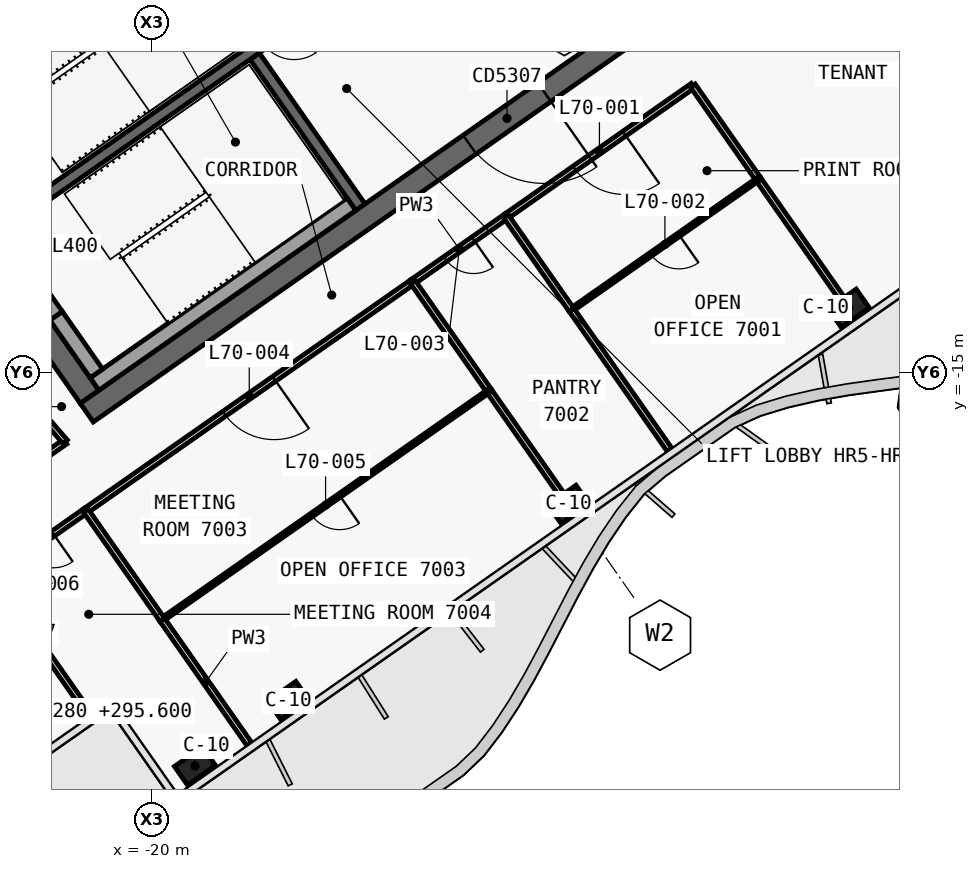
"""IFC4 building model, lengths in metres.
Left out: names, types, materials, properties, quantities, classifications, styles, units other than length and angle.
Written with IfcOpenShell. Run it as: python <this file> out.ifc"""

import sys

from ifc_helpers import new_model, si_unit, direction, frame, frame_2d, origin, origin_2d, place, context, subcontext, project, spatial, polyline, rectangle, outline, extrude, element, fill, save


model = new_model("IFC4")
c1 = context("Model", 3, precision=1e-05, world=origin(), true_north=direction((0.0, 1.0)))
c2 = subcontext(c1, "Body", "Model", "MODEL_VIEW")
j1 = project(units=[si_unit("LENGTHUNIT", "METRE"), si_unit("PLANEANGLEUNIT", "RADIAN")], contexts=[c1])
p1 = place(None, origin())
s1 = spatial("IfcSite", under=j1, at=p1, CompositionType="ELEMENT")
p2 = place(p1, origin())
s2 = spatial("IfcBuilding", under=s1, at=p2, CompositionType="ELEMENT")
p3 = place(p2, frame((0.0, 0.0, 295.6)))
s3 = spatial("IfcBuildingStorey", under=s2, at=p3, CompositionType="ELEMENT", Elevation=295.6)
p4 = place(p3, frame((-0.028, 12.066, 0.0), z_axis=(0.0, 0.0, 1.0), x_axis=(-0.819151382952, -0.573577380837, 0.0)))
e1 = element("IfcWall", 1, at=p4, inside=s3, PredefinedType="SHEAR", context=c2, shape_type="SweptSolid", body=[
    extrude(outline(polyline([(33.898, 0.3), (0.42, 0.3), (0.0, -0.3), (33.898, -0.3), (33.898, 0.3)])), origin(), (0.0, 0.0, 1.0), 3.9),
])
p5 = place(p3, frame((-0.028, -0.874, 0.0), z_axis=(0.0, 0.0, 1.0), x_axis=(-0.819150035022, -0.573579305871, 0.0)))
e2 = element("IfcWall", 2, at=p5, inside=s3, PredefinedType="SHEAR", context=c2, shape_type="SweptSolid", body=[
    extrude(outline(polyline([(26.476, 0.3), (0.42, 0.3), (0.0, -0.3), (26.476, -0.3), (26.476, 0.3)])), origin(), (0.0, 0.0, 1.0), 3.9),
])
p6 = place(p5, frame((2.976, 0.0, 0.0)))
e3 = element("IfcOpeningElement", 3, at=p6, cuts=e2, PredefinedType="OPENING", context=c2, shape_type="SweptSolid", body=[
    extrude(rectangle(XDim=2.4, YDim=2.1, at=frame_2d((1.2, 1.05))), frame((0.0, 0.31, 0.0), z_axis=(0.0, -1.0, 0.0), x_axis=(1.0, 0.0, 0.0)), (0.0, 0.0, 1.0), 0.62),
])
p7 = place(p5, frame((11.776, 0.0, 0.0)))
e4 = element("IfcOpeningElement", 4, at=p7, cuts=e2, PredefinedType="OPENING", context=c2, shape_type="SweptSolid", body=[
    extrude(rectangle(XDim=2.4, YDim=2.1, at=frame_2d((1.2, 1.05))), frame((0.0, 0.31, 0.0), z_axis=(0.0, -1.0, 0.0), x_axis=(1.0, 0.0, 0.0)), (0.0, 0.0, 1.0), 0.62),
])
p8 = place(p3, frame((-21.642, -15.642, 0.0), z_axis=(0.0, 0.0, 1.0), x_axis=(-0.573586866468, 0.819144740944, 0.0)))
e5 = element("IfcWall", 5, at=p8, inside=s3, PredefinedType="SHEAR", context=c2, shape_type="SweptSolid", body=[
    extrude(outline(polyline([(0.0, 0.3), (0.0, -0.3), (10.0, -0.3), (10.0, 0.3), (0.0, 0.3)])), origin(), (0.0, 0.0, 1.0), 3.9),
])
p9 = place(p8, frame((6.5, 0.0, 0.0)))
e6 = element("IfcOpeningElement", 6, at=p9, cuts=e5, PredefinedType="OPENING", context=c2, shape_type="SweptSolid", body=[
    extrude(rectangle(XDim=1.8, YDim=2.1, at=frame_2d((0.9, 1.05))), frame((0.0, 0.31, 0.0), z_axis=(0.0, -1.0, 0.0), x_axis=(1.0, 0.0, 0.0)), (0.0, 0.0, 1.0), 0.62),
])
p10 = place(p8, frame((2.3, 0.0, 0.0)))
e7 = element("IfcOpeningElement", 7, at=p10, cuts=e5, PredefinedType="OPENING", context=c2, shape_type="SweptSolid", body=[
    extrude(rectangle(XDim=1.8, YDim=2.1, at=frame_2d((0.9, 1.05))), frame((0.0, 0.31, 0.0), z_axis=(0.0, -1.0, 0.0), x_axis=(1.0, 0.0, 0.0)), (0.0, 0.0, 1.0), 0.62),
])
p11 = place(p3, frame((-14.515, -10.652, 0.0), z_axis=(0.0, 0.0, 1.0), x_axis=(-0.573560315113, 0.819163332265, 0.0)))
e8 = element("IfcWall", 8, at=p11, inside=s3, PredefinedType="SHEAR", context=c2, shape_type="SweptSolid", body=[
    extrude(outline(polyline([(4.85, 0.15), (0.0, 0.15), (0.0, -0.15), (4.85, -0.15), (4.85, 0.15)])), origin(), (0.0, 0.0, 1.0), 3.9),
])
p12 = place(p3, frame((-2.638, 3.768, 0.0), z_axis=(0.0, 0.0, 1.0), x_axis=(-0.819155014212, -0.573572194837, 0.0)))
e9 = element("IfcWall", 9, at=p12, inside=s3, PredefinedType="SHEAR", context=c2, shape_type="SweptSolid", body=[
    extrude(outline(polyline([(26.4, 0.15), (0.0, 0.15), (0.0, -0.15), (26.4, -0.15), (26.4, 0.15)])), origin(), (0.0, 0.0, 1.0), 3.9),
])
p13 = place(p12, frame((1.169, 0.0, 0.0)))
e10 = element("IfcOpeningElement", 10, at=p13, cuts=e9, PredefinedType="OPENING", context=c2, shape_type="SweptSolid", body=[
    extrude(rectangle(XDim=1.1, YDim=2.1, at=frame_2d((0.55, 1.05))), frame((0.0, 0.16, 0.0), z_axis=(0.0, -1.0, 0.0), x_axis=(1.0, 0.0, 0.0)), (0.0, 0.0, 1.0), 0.32),
])
p14 = place(p12, frame((3.206, 0.0, 0.0)))
e11 = element("IfcOpeningElement", 11, at=p14, cuts=e9, PredefinedType="OPENING", context=c2, shape_type="SweptSolid", body=[
    extrude(rectangle(XDim=1.1, YDim=2.1, at=frame_2d((0.55, 1.05))), frame((0.0, 0.16, 0.0), z_axis=(0.0, -1.0, 0.0), x_axis=(1.0, 0.0, 0.0)), (0.0, 0.0, 1.0), 0.32),
])
p15 = place(p12, frame((5.244, 0.0, 0.0)))
e12 = element("IfcOpeningElement", 12, at=p15, cuts=e9, PredefinedType="OPENING", context=c2, shape_type="SweptSolid", body=[
    extrude(rectangle(XDim=1.1, YDim=2.1, at=frame_2d((0.55, 1.05))), frame((0.0, 0.16, 0.0), z_axis=(0.0, -1.0, 0.0), x_axis=(1.0, 0.0, 0.0)), (0.0, 0.0, 1.0), 0.32),
])
p16 = place(p12, frame((7.281, 0.0, 0.0)))
e13 = element("IfcOpeningElement", 13, at=p16, cuts=e9, PredefinedType="OPENING", context=c2, shape_type="SweptSolid", body=[
    extrude(rectangle(XDim=1.1, YDim=2.1, at=frame_2d((0.55, 1.05))), frame((0.0, 0.16, 0.0), z_axis=(0.0, -1.0, 0.0), x_axis=(1.0, 0.0, 0.0)), (0.0, 0.0, 1.0), 0.32),
])
p17 = place(p12, frame((9.688, 0.0, 0.0)))
e14 = element("IfcOpeningElement", 14, at=p17, cuts=e9, PredefinedType="OPENING", context=c2, shape_type="SweptSolid", body=[
    extrude(rectangle(XDim=1.1, YDim=2.1, at=frame_2d((0.55, 1.05))), frame((0.0, 0.16, 0.0), z_axis=(0.0, -1.0, 0.0), x_axis=(1.0, 0.0, 0.0)), (0.0, 0.0, 1.0), 0.32),
])
p18 = place(p12, frame((11.863, 0.0, 0.0)))
e15 = element("IfcOpeningElement", 15, at=p18, cuts=e9, PredefinedType="OPENING", context=c2, shape_type="SweptSolid", body=[
    extrude(rectangle(XDim=1.1, YDim=2.1, at=frame_2d((0.55, 1.05))), frame((0.0, 0.16, 0.0), z_axis=(0.0, -1.0, 0.0), x_axis=(1.0, 0.0, 0.0)), (0.0, 0.0, 1.0), 0.32),
])
p19 = place(p12, frame((14.552, 0.0, 0.0)))
e16 = element("IfcOpeningElement", 16, at=p19, cuts=e9, PredefinedType="OPENING", context=c2, shape_type="SweptSolid", body=[
    extrude(rectangle(XDim=1.0, YDim=2.1, at=frame_2d((0.5, 1.05))), frame((0.0, 0.16, 0.0), z_axis=(0.0, -1.0, 0.0), x_axis=(1.0, 0.0, 0.0)), (0.0, 0.0, 1.0), 0.32),
])
p20 = place(p12, frame((16.627, 0.0, 0.0)))
e17 = element("IfcOpeningElement", 17, at=p20, cuts=e9, PredefinedType="OPENING", context=c2, shape_type="SweptSolid", body=[
    extrude(rectangle(XDim=1.0, YDim=2.1, at=frame_2d((0.5, 1.05))), frame((0.0, 0.16, 0.0), z_axis=(0.0, -1.0, 0.0), x_axis=(1.0, 0.0, 0.0)), (0.0, 0.0, 1.0), 0.32),
])
for number, where, z_axis, x_axis in (
    (18, (-1.665, -13.313, 0.0), (0.0, 0.0, 1.0), (-0.819, -0.574, 0.0)),
    (19, (-9.038, -18.475, 0.0), (0.0, 0.0, 1.0), (-0.819, -0.574, 0.0)),
    (20, (-16.41, -23.637, 0.0), (0.0, 0.0, 1.0), (-0.819, -0.574, 0.0)),
    (21, (-18.867, -25.358, 0.0), (0.0, 0.0, 1.0), (-0.819, -0.574, 0.0)),
):
    element("IfcColumn", number, at=place(p3, frame(where, z_axis=z_axis, x_axis=x_axis)), inside=s3, PredefinedType="COLUMN", context=c2, shape_type="SweptSolid", body=[
        extrude(rectangle(XDim=0.9, YDim=0.6, at=origin_2d()), origin(), (0.0, 0.0, 1.0), 3.9),
    ])
p21 = place(p3, frame((-20.259, -2.71, 0.0), z_axis=(0.0, 0.0, 1.0), x_axis=(-0.81914849389, -0.573581506813, 0.0)))
e22 = element("IfcWall", 22, at=p21, inside=s3, PredefinedType="SOLIDWALL", context=c2, shape_type="SweptSolid", body=[
    extrude(rectangle(XDim=8.25, YDim=0.4, at=frame_2d((4.125, 0.0))), origin(), (0.0, 0.0, 1.0), 3.62),
])
p22 = place(p3, frame((-14.753, -10.574, 0.0), z_axis=(0.0, 0.0, 1.0), x_axis=(-0.819158229677, -0.573567602601, 0.0)))
e23 = element("IfcWall", 23, at=p22, inside=s3, PredefinedType="SOLIDWALL", context=c2, shape_type="SweptSolid", body=[
    extrude(rectangle(XDim=8.25, YDim=0.4, at=frame_2d((4.125, 0.0))), origin(), (0.0, 0.0, 1.0), 3.62),
])
p23 = place(p3, frame((-21.462, -15.028, 0.0), z_axis=(0.0, 0.0, 1.0), x_axis=(-0.573559770908, 0.819163713305, 0.0)))
e24 = element("IfcWall", 24, at=p23, inside=s3, PredefinedType="SOLIDWALL", context=c2, shape_type="SweptSolid", body=[
    extrude(rectangle(XDim=1.85, YDim=0.4, at=frame_2d((0.925, 0.0))), origin(), (0.0, 0.0, 1.0), 3.62),
])
p24 = place(p3, frame((-22.523, -13.512, 2.15), z_axis=(0.0, 0.0, 1.0), x_axis=(-0.573591692345, 0.819141361715, 0.0)))
e25 = element("IfcWall", 25, at=p24, inside=s3, PredefinedType="SOLIDWALL", context=c2, shape_type="SweptSolid", body=[
    extrude(rectangle(XDim=1.9, YDim=0.4, at=frame_2d((0.95, 0.0))), origin(), (0.0, 0.0, 1.0), 1.47),
])
p25 = place(p3, frame((-26.54, -19.804, 0.0), z_axis=(0.0, 0.0, 1.0), x_axis=(0.819163496387, 0.573560080713, 0.0)))
e26 = element("IfcWall", 26, at=p25, inside=s3, PredefinedType="PARTITIONING", context=c2, shape_type="SweptSolid", body=[
    extrude(rectangle(XDim=5.197, YDim=0.15, at=frame_2d((2.598, 0.0))), origin(), (0.0, 0.0, 1.0), 3.05),
])
p26 = place(p25, frame((1.799, 0.0, 0.0)))
e27 = element("IfcOpeningElement", 27, at=p26, cuts=e26, PredefinedType="OPENING", context=c2, shape_type="SweptSolid", body=[
    extrude(rectangle(XDim=1.6, YDim=2.1, at=frame_2d((0.8, 1.05))), frame((0.0, 0.085, 0.0), z_axis=(0.0, -1.0, 0.0), x_axis=(1.0, 0.0, 0.0)), (0.0, 0.0, 1.0), 0.17),
])
p27 = place(p3, frame((-5.766, -7.456, 0.0), z_axis=(0.0, 0.0, 1.0), x_axis=(-0.819147828287, -0.573582457378, 0.0)))
e28 = element("IfcWall", 28, at=p27, inside=s3, PredefinedType="PARTITIONING", context=c2, shape_type="SweptSolid", body=[
    extrude(rectangle(XDim=6.002, YDim=0.15, at=frame_2d((3.001, 0.0))), origin(), (0.0, 0.0, 1.0), 3.05),
])
p28 = place(p27, frame((2.201, 0.0, 0.0)))
e29 = element("IfcOpeningElement", 29, at=p28, cuts=e28, PredefinedType="OPENING", context=c2, shape_type="SweptSolid", body=[
    extrude(rectangle(XDim=1.6, YDim=2.1, at=frame_2d((0.8, 1.05))), frame((0.0, 0.085, 0.0), z_axis=(0.0, -1.0, 0.0), x_axis=(1.0, 0.0, 0.0)), (0.0, 0.0, 1.0), 0.17),
])
p29 = place(p3, frame((-10.68, -10.896, 0.0), z_axis=(0.0, 0.0, 1.0), x_axis=(-0.819128818764, -0.573609604409, 0.0)))
e30 = element("IfcWall", 30, at=p29, inside=s3, PredefinedType="PARTITIONING", context=c2, shape_type="SweptSolid", body=[
    extrude(rectangle(XDim=3.004, YDim=0.15, at=frame_2d((1.502, 0.0))), origin(), (0.0, 0.0, 1.0), 3.05),
])
p30 = place(p29, frame((1.052, 0.0, 0.0)))
e31 = element("IfcOpeningElement", 31, at=p30, cuts=e30, PredefinedType="OPENING", context=c2, shape_type="SweptSolid", body=[
    extrude(rectangle(XDim=0.9, YDim=2.1, at=frame_2d((0.45, 1.05))), frame((0.0, 0.085, 0.0), z_axis=(0.0, -1.0, 0.0), x_axis=(1.0, 0.0, 0.0)), (0.0, 0.0, 1.0), 0.17),
])
p31 = place(p3, frame((-13.137, -12.617, 0.0), z_axis=(0.0, 0.0, 1.0), x_axis=(-0.819156568366, -0.573569975245, 0.0)))
e32 = element("IfcWall", 32, at=p31, inside=s3, PredefinedType="PARTITIONING", context=c2, shape_type="SweptSolid", body=[
    extrude(rectangle(XDim=10.504, YDim=0.15, at=frame_2d((5.252, 0.0))), origin(), (0.0, 0.0, 1.0), 3.05),
])
p32 = place(p31, frame((4.452, 0.0, 0.0)))
e33 = element("IfcOpeningElement", 33, at=p32, cuts=e32, PredefinedType="OPENING", context=c2, shape_type="SweptSolid", body=[
    extrude(rectangle(XDim=1.6, YDim=2.1, at=frame_2d((0.8, 1.05))), frame((0.0, 0.085, 0.0), z_axis=(0.0, -1.0, 0.0), x_axis=(1.0, 0.0, 0.0)), (0.0, 0.0, 1.0), 0.17),
])
p33 = place(p3, frame((-21.738, -18.639, 0.0), z_axis=(0.0, 0.0, 1.0), x_axis=(-0.81916700466, -0.573555070134, 0.0)))
e34 = element("IfcWall", 34, at=p33, inside=s3, PredefinedType="PARTITIONING", context=c2, shape_type="SweptSolid", body=[
    extrude(rectangle(XDim=3.004, YDim=0.15, at=frame_2d((1.502, 0.0))), origin(), (0.0, 0.0, 1.0), 3.05),
])
p34 = place(p33, frame((1.052, 0.0, 0.0)))
e35 = element("IfcOpeningElement", 35, at=p34, cuts=e34, PredefinedType="OPENING", context=c2, shape_type="SweptSolid", body=[
    extrude(rectangle(XDim=0.9, YDim=2.1, at=frame_2d((0.45, 1.05))), frame((0.0, 0.085, 0.0), z_axis=(0.0, -1.0, 0.0), x_axis=(1.0, 0.0, 0.0)), (0.0, 0.0, 1.0), 0.17),
])
p35 = place(p3, frame((-1.849, -13.051, 0.0), z_axis=(0.0, 0.0, 1.0), x_axis=(-0.573586379587, 0.81914508187, 0.0)))
e36 = element("IfcWall", 36, at=p35, inside=s3, PredefinedType="PARTITIONING", context=c2, shape_type="SweptSolid", body=[
    extrude(rectangle(XDim=3.831, YDim=0.15, at=frame_2d((1.916, 0.0))), origin(), (0.0, 0.0, 1.0), 3.05),
])
p36 = place(p3, frame((-4.044, -9.915, 0.0), z_axis=(0.0, 0.0, 1.0), x_axis=(-0.573609604409, 0.819128818764, 0.0)))
e37 = element("IfcWall", 37, at=p36, inside=s3, PredefinedType="PARTITIONING", context=c2, shape_type="SweptSolid", body=[
    extrude(rectangle(XDim=3.004, YDim=0.15, at=frame_2d((1.502, 0.0))), origin(), (0.0, 0.0, 1.0), 3.05),
])
p37 = place(p3, frame((-22.284, -16.826, 0.0), z_axis=(0.0, 0.0, 1.0), x_axis=(-0.656758142177, 0.754101281449, 0.0)))
e38 = element("IfcWall", 38, at=p37, inside=s3, PredefinedType="PARTITIONING", context=c2, shape_type="SweptSolid", body=[
    extrude(rectangle(XDim=6.539, YDim=0.15, at=frame_2d((3.269, 0.0))), origin(), (0.0, 0.0, 1.0), 3.62),
])
p38 = place(p3, frame((-4.045, -9.914, 0.0), z_axis=(0.0, 0.0, 1.0), x_axis=(-0.819149710902, -0.573579768758, 0.0)))
e39 = element("IfcWall", 39, at=p38, inside=s3, PredefinedType="PARTITIONING", context=c2, shape_type="SweptSolid", body=[
    extrude(rectangle(XDim=6.0, YDim=0.1, at=frame_2d((3.0, 0.0))), origin(), (0.0, 0.0, 1.0), 3.05),
])
p39 = place(p38, frame((2.55, 0.0, 0.0)))
e40 = element("IfcOpeningElement", 40, at=p39, cuts=e39, PredefinedType="OPENING", context=c2, shape_type="SweptSolid", body=[
    extrude(rectangle(XDim=0.9, YDim=2.1, at=frame_2d((0.45, 1.05))), frame((0.0, 0.06, 0.0), z_axis=(0.0, -1.0, 0.0), x_axis=(1.0, 0.0, 0.0)), (0.0, 0.0, 1.0), 0.12),
])
p40 = place(p3, frame((-6.379, -17.041, 0.0), z_axis=(0.0, 0.0, 1.0), x_axis=(-0.573564311442, 0.819160534108, 0.0)))
e41 = element("IfcWall", 41, at=p40, inside=s3, PredefinedType="PARTITIONING", context=c2, shape_type="SweptSolid", body=[
    extrude(rectangle(XDim=4.499, YDim=0.15, at=frame_2d((2.25, 0.0))), origin(), (0.0, 0.0, 1.0), 3.0),
])
p41 = place(p3, frame((-8.96, -13.355, 0.0), z_axis=(0.0, 0.0, 1.0), x_axis=(-0.573615254604, 0.819124862085, 0.0)))
e42 = element("IfcWall", 42, at=p41, inside=s3, PredefinedType="PARTITIONING", context=c2, shape_type="SweptSolid", body=[
    extrude(rectangle(XDim=3.0, YDim=0.15, at=frame_2d((1.5, 0.0))), origin(), (0.0, 0.0, 1.0), 3.62),
])
p42 = place(p3, frame((-9.221, -18.213, 0.0), z_axis=(0.0, 0.0, 1.0), x_axis=(-0.573565634093, 0.819159608006, 0.0)))
e43 = element("IfcWall", 43, at=p42, inside=s3, PredefinedType="PARTITIONING", context=c2, shape_type="SweptSolid", body=[
    extrude(rectangle(XDim=3.331, YDim=0.15, at=frame_2d((1.666, 0.0))), origin(), (0.0, 0.0, 1.0), 3.05),
])
p43 = place(p3, frame((-11.13, -15.487, 0.0), z_axis=(0.0, 0.0, 1.0), x_axis=(-0.573523165603, 0.819189342287, 0.0)))
e44 = element("IfcWall", 44, at=p43, inside=s3, PredefinedType="PARTITIONING", context=c2, shape_type="SweptSolid", body=[
    extrude(rectangle(XDim=3.502, YDim=0.15, at=frame_2d((1.751, 0.0))), origin(), (0.0, 0.0, 1.0), 3.05),
])
p44 = place(p3, frame((-11.131, -15.486, 0.0), z_axis=(0.0, 0.0, 1.0), x_axis=(-0.819155448096, -0.573571575181, 0.0)))
e45 = element("IfcWall", 45, at=p44, inside=s3, PredefinedType="PARTITIONING", context=c2, shape_type="SweptSolid", body=[
    extrude(rectangle(XDim=10.5, YDim=0.1, at=frame_2d((5.25, 0.0))), origin(), (0.0, 0.0, 1.0), 3.05),
])
p45 = place(p44, frame((4.8, 0.0, 0.0)))
e46 = element("IfcOpeningElement", 46, at=p45, cuts=e45, PredefinedType="OPENING", context=c2, shape_type="SweptSolid", body=[
    extrude(rectangle(XDim=0.9, YDim=2.1, at=frame_2d((0.45, 1.05))), frame((0.0, 0.06, 0.0), z_axis=(0.0, -1.0, 0.0), x_axis=(1.0, 0.0, 0.0)), (0.0, 0.0, 1.0), 0.12),
])
p46 = place(p3, frame((-17.438, -24.784, 0.0), z_axis=(0.0, 0.0, 1.0), x_axis=(-0.573560675104, 0.819163080207, 0.0)))
e47 = element("IfcWall", 47, at=p46, inside=s3, PredefinedType="PARTITIONING", context=c2, shape_type="SweptSolid", body=[
    extrude(rectangle(XDim=3.999, YDim=0.15, at=frame_2d((2.0, 0.0))), origin(), (0.0, 0.0, 1.0), 3.0),
])
p47 = place(p3, frame((-19.732, -21.508, 0.0), z_axis=(0.0, 0.0, 1.0), x_axis=(-0.573551294295, 0.819169648371, 0.0)))
e48 = element("IfcWall", 48, at=p47, inside=s3, PredefinedType="PARTITIONING", context=c2, shape_type="SweptSolid", body=[
    extrude(rectangle(XDim=3.5, YDim=0.15, at=frame_2d((1.75, 0.0))), origin(), (0.0, 0.0, 1.0), 3.62),
])
p48 = place(p3, frame((-21.616, -24.048, 0.0), z_axis=(0.0, 0.0, 1.0), x_axis=(-0.573560650686, 0.819163097304, 0.0)))
e49 = element("IfcWall", 49, at=p48, inside=s3, PredefinedType="PARTITIONING", context=c2, shape_type="SweptSolid", body=[
    extrude(rectangle(XDim=4.5, YDim=0.15, at=frame_2d((2.25, 0.0))), origin(), (0.0, 0.0, 1.0), 3.62),
])
p49 = place(p7, origin())
e50 = element("IfcDoor", 50, at=p49, inside=s3, OperationType="DOUBLE_DOOR_SINGLE_SWING", PredefinedType="DOOR", context=c2, shape_type="SweptSolid", body=[
    extrude(rectangle(XDim=2.4, YDim=2.1, at=frame_2d((1.2, 1.05))), frame((0.0, 0.025, 0.0), z_axis=(0.0, -1.0, 0.0), x_axis=(1.0, 0.0, 0.0)), (0.0, 0.0, 1.0), 0.05),
])
fill(e4, e50)
p50 = place(p28, origin())
e51 = element("IfcDoor", 51, at=p50, inside=s3, OperationType="DOUBLE_DOOR_SINGLE_SWING", PredefinedType="DOOR", context=c2, shape_type="SweptSolid", body=[
    extrude(rectangle(XDim=1.6, YDim=2.1, at=frame_2d((0.8, 1.05))), frame((0.0, 0.025, 0.0), z_axis=(0.0, -1.0, 0.0), x_axis=(1.0, 0.0, 0.0)), (0.0, 0.0, 1.0), 0.05),
])
fill(e29, e51)
p51 = place(p39, origin())
e52 = element("IfcDoor", 52, at=p51, inside=s3, OperationType="SINGLE_SWING_RIGHT", PredefinedType="DOOR", context=c2, shape_type="SweptSolid", body=[
    extrude(rectangle(XDim=0.9, YDim=2.1, at=frame_2d((0.45, 1.05))), frame((0.0, 0.025, 0.0), z_axis=(0.0, -1.0, 0.0), x_axis=(1.0, 0.0, 0.0)), (0.0, 0.0, 1.0), 0.05),
])
fill(e40, e52)
p52 = place(p30, origin())
e53 = element("IfcDoor", 53, at=p52, inside=s3, OperationType="SINGLE_SWING_RIGHT", PredefinedType="DOOR", context=c2, shape_type="SweptSolid", body=[
    extrude(rectangle(XDim=0.9, YDim=2.1, at=frame_2d((0.45, 1.05))), frame((0.0, 0.025, 0.0), z_axis=(0.0, -1.0, 0.0), x_axis=(1.0, 0.0, 0.0)), (0.0, 0.0, 1.0), 0.05),
])
fill(e31, e53)
p53 = place(p32, origin())
e54 = element("IfcDoor", 54, at=p53, inside=s3, OperationType="DOUBLE_DOOR_SINGLE_SWING", PredefinedType="DOOR", context=c2, shape_type="SweptSolid", body=[
    extrude(rectangle(XDim=1.6, YDim=2.1, at=frame_2d((0.8, 1.05))), frame((0.0, 0.025, 0.0), z_axis=(0.0, -1.0, 0.0), x_axis=(1.0, 0.0, 0.0)), (0.0, 0.0, 1.0), 0.05),
])
fill(e33, e54)
p54 = place(p45, origin())
e55 = element("IfcDoor", 55, at=p54, inside=s3, OperationType="SINGLE_SWING_LEFT", PredefinedType="DOOR", context=c2, shape_type="SweptSolid", body=[
    extrude(rectangle(XDim=0.9, YDim=2.1, at=frame_2d((0.45, 1.05))), frame((0.0, 0.025, 0.0), z_axis=(0.0, -1.0, 0.0), x_axis=(1.0, 0.0, 0.0)), (0.0, 0.0, 1.0), 0.05),
])
fill(e46, e55)
p55 = place(p34, origin())
e56 = element("IfcDoor", 56, at=p55, inside=s3, OperationType="SINGLE_SWING_LEFT", PredefinedType="DOOR", context=c2, shape_type="SweptSolid", body=[
    extrude(rectangle(XDim=0.9, YDim=2.1, at=frame_2d((0.45, 1.05))), frame((0.0, 0.025, 0.0), z_axis=(0.0, -1.0, 0.0), x_axis=(1.0, 0.0, 0.0)), (0.0, 0.0, 1.0), 0.05),
])
fill(e35, e56)
save(model, sys.argv[1])
